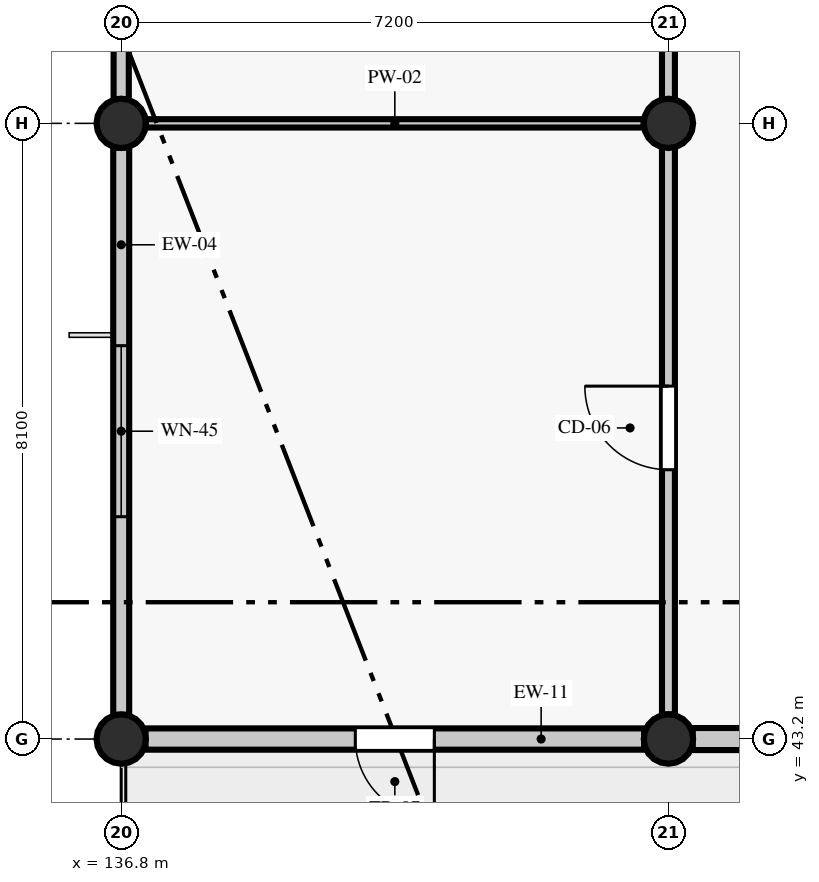
"""IFC4 building model, lengths in metres.
Left out: names, types, materials, properties, quantities, classifications, styles, units other than length and angle.
Written with IfcOpenShell. Run it as: python <this file> out.ifc"""

import sys

from ifc_helpers import new_model, si_unit, direction, frame, frame_2d, origin, origin_2d, place, context, subcontext, project, spatial, rectangle, circle, extrude, element, fill, save


model = new_model("IFC4")
c1 = context("Model", 3, precision=1e-05, world=origin(), true_north=direction((0.0, 1.0)))
c2 = subcontext(c1, "Body", "Model", "MODEL_VIEW")
j1 = project(units=[si_unit("LENGTHUNIT", "METRE"), si_unit("PLANEANGLEUNIT", "RADIAN")], contexts=[c1])
p1 = place(None, origin())
s1 = spatial("IfcSite", under=j1, at=p1, CompositionType="ELEMENT")
p2 = place(p1, origin())
s2 = spatial("IfcBuilding", under=s1, at=p2, CompositionType="ELEMENT")
p3 = place(p2, frame((0.0, 0.0, 4.8)))
s3 = spatial("IfcBuildingStorey", under=s2, at=p3, CompositionType="ELEMENT", Elevation=4.8)
for number, where, z_axis, x_axis in (
    (1, (136.8, 43.2, 0.0), (0.0, 0.0, 1.0), (1.0, 0.0, 0.0)),
    (2, (136.8, 51.3, 0.0), (0.0, 0.0, 1.0), (1.0, 0.0, 0.0)),
    (3, (144.0, 43.2, 0.0), (0.0, 0.0, 1.0), (1.0, 0.0, 0.0)),
    (4, (144.0, 51.3, 0.0), (0.0, 0.0, 1.0), (1.0, 0.0, 0.0)),
):
    element("IfcColumn", number, at=place(p3, frame(where, z_axis=z_axis, x_axis=x_axis)), inside=s3, PredefinedType="COLUMN", context=c2, shape_type="SweptSolid", body=[
        extrude(circle(Radius=0.325, at=origin_2d()), origin(), (0.0, 0.0, 1.0), 4.56),
    ])
p4 = place(p3, frame((137.12, 43.2, 0.0), z_axis=(0.0, 0.0, 1.0), x_axis=(1.0, 0.0, 0.0)))
e5 = element("IfcWall", 5, at=p4, inside=s3, PredefinedType="STANDARD", context=c2, shape_type="SweptSolid", body=[
    extrude(rectangle(XDim=6.56, YDim=0.28, at=frame_2d((3.28, 0.0))), origin(), (0.0, 0.0, 1.0), 3.91),
])
p5 = place(p4, frame((2.76, 0.0, 0.0)))
e6 = element("IfcOpeningElement", 6, at=p5, cuts=e5, PredefinedType="OPENING", context=c2, shape_type="SweptSolid", body=[
    extrude(rectangle(XDim=1.04, YDim=2.1, at=frame_2d((0.52, 1.05))), frame((0.0, 0.15, 0.0), z_axis=(0.0, -1.0, 0.0), x_axis=(1.0, 0.0, 0.0)), (0.0, 0.0, 1.0), 0.3),
])
p6 = place(p3, frame((144.32, 43.2, 0.0), z_axis=(0.0, 0.0, 1.0), x_axis=(1.0, 0.0, 0.0)))
e7 = element("IfcWall", 7, at=p6, inside=s3, PredefinedType="STANDARD", context=c2, shape_type="SweptSolid", body=[
    extrude(rectangle(XDim=2.378, YDim=0.29, at=frame_2d((1.189, 0.0))), origin(), (0.0, 0.0, 1.0), 4.56),
])
p7 = place(p6, frame((0.714, 0.0, 0.9)))
e8 = element("IfcOpeningElement", 8, at=p7, cuts=e7, PredefinedType="OPENING", context=c2, shape_type="SweptSolid", body=[
    extrude(rectangle(XDim=0.95, YDim=1.3, at=frame_2d((0.475, 0.65))), frame((0.0, 0.155, 0.0), z_axis=(0.0, -1.0, 0.0), x_axis=(1.0, 0.0, 0.0)), (0.0, 0.0, 1.0), 0.31),
])
p8 = place(p3, frame((136.8, 59.08, 0.0), z_axis=(0.0, 0.0, 1.0), x_axis=(0.0, -1.0, 0.0)))
e9 = element("IfcWall", 9, at=p8, inside=s3, PredefinedType="STANDARD", context=c2, shape_type="SweptSolid", body=[
    extrude(rectangle(XDim=7.46, YDim=0.2, at=frame_2d((3.73, 0.0))), origin(), (0.0, 0.0, 1.0), 3.91),
])
p9 = place(p8, frame((3.18, 0.0, 0.9)))
e10 = element("IfcOpeningElement", 10, at=p9, cuts=e9, PredefinedType="OPENING", context=c2, shape_type="SweptSolid", body=[
    extrude(rectangle(XDim=2.0, YDim=1.78, at=frame_2d((1.0, 0.89))), frame((0.0, 0.11, 0.0), z_axis=(0.0, -1.0, 0.0), x_axis=(1.0, 0.0, 0.0)), (0.0, 0.0, 1.0), 0.22),
])
p10 = place(p3, frame((136.8, 50.98, 0.0), z_axis=(0.0, 0.0, 1.0), x_axis=(0.0, -1.0, 0.0)))
e11 = element("IfcWall", 11, at=p10, inside=s3, PredefinedType="STANDARD", context=c2, shape_type="SweptSolid", body=[
    extrude(rectangle(XDim=7.46, YDim=0.21, at=frame_2d((3.73, 0.0))), origin(), (0.0, 0.0, 1.0), 3.91),
])
p11 = place(p10, frame((2.605, 0.0, 0.9)))
e12 = element("IfcOpeningElement", 12, at=p11, cuts=e11, PredefinedType="OPENING", context=c2, shape_type="SweptSolid", body=[
    extrude(rectangle(XDim=2.25, YDim=1.78, at=frame_2d((1.125, 0.89))), frame((0.0, 0.115, 0.0), z_axis=(0.0, -1.0, 0.0), x_axis=(1.0, 0.0, 0.0)), (0.0, 0.0, 1.0), 0.23),
])
p12 = place(p3, frame((144.0, 43.525, 0.0), z_axis=(0.0, 0.0, 1.0), x_axis=(0.0, 1.0, 0.0)))
e13 = element("IfcWall", 13, at=p12, inside=s3, PredefinedType="PARTITIONING", context=c2, shape_type="SweptSolid", body=[
    extrude(rectangle(XDim=31.75, YDim=0.17, at=frame_2d((15.875, 0.0))), origin(), (0.0, 0.0, 1.0), 4.068),
])
p13 = place(p12, frame((3.218, 0.0, 0.0)))
e14 = element("IfcOpeningElement", 14, at=p13, cuts=e13, PredefinedType="OPENING", context=c2, shape_type="SweptSolid", body=[
    extrude(rectangle(XDim=1.1, YDim=2.08, at=frame_2d((0.55, 1.04))), frame((0.0, 0.095, 0.0), z_axis=(0.0, -1.0, 0.0), x_axis=(1.0, 0.0, 0.0)), (0.0, 0.0, 1.0), 0.19),
])
p14 = place(p12, frame((8.925, 0.0, 0.0)))
e15 = element("IfcOpeningElement", 15, at=p14, cuts=e13, PredefinedType="OPENING", context=c2, shape_type="SweptSolid", body=[
    extrude(rectangle(XDim=0.9, YDim=2.08, at=frame_2d((0.45, 1.04))), frame((0.0, 0.095, 0.0), z_axis=(0.0, -1.0, 0.0), x_axis=(1.0, 0.0, 0.0)), (0.0, 0.0, 1.0), 0.19),
])
p15 = place(p12, frame((11.6, 0.0, 0.0)))
e16 = element("IfcOpeningElement", 16, at=p15, cuts=e13, PredefinedType="OPENING", context=c2, shape_type="SweptSolid", body=[
    extrude(rectangle(XDim=0.9, YDim=2.13, at=frame_2d((0.45, 1.065))), frame((0.0, 0.095, 0.0), z_axis=(0.0, -1.0, 0.0), x_axis=(1.0, 0.0, 0.0)), (0.0, 0.0, 1.0), 0.19),
])
p16 = place(p12, frame((13.915, 0.0, 0.0)))
e17 = element("IfcOpeningElement", 17, at=p16, cuts=e13, PredefinedType="OPENING", context=c2, shape_type="SweptSolid", body=[
    extrude(rectangle(XDim=0.92, YDim=2.18, at=frame_2d((0.46, 1.09))), frame((0.0, 0.095, 0.0), z_axis=(0.0, -1.0, 0.0), x_axis=(1.0, 0.0, 0.0)), (0.0, 0.0, 1.0), 0.19),
])
p17 = place(p12, frame((19.205, 0.0, 0.0)))
e18 = element("IfcOpeningElement", 18, at=p17, cuts=e13, PredefinedType="OPENING", context=c2, shape_type="SweptSolid", body=[
    extrude(rectangle(XDim=1.05, YDim=2.13, at=frame_2d((0.525, 1.065))), frame((0.0, 0.095, 0.0), z_axis=(0.0, -1.0, 0.0), x_axis=(1.0, 0.0, 0.0)), (0.0, 0.0, 1.0), 0.19),
])
p18 = place(p12, frame((27.256, 0.0, 0.0)))
e19 = element("IfcOpeningElement", 19, at=p18, cuts=e13, PredefinedType="OPENING", context=c2, shape_type="SweptSolid", body=[
    extrude(rectangle(XDim=1.74, YDim=2.26, at=frame_2d((0.87, 1.13))), frame((0.0, 0.095, 0.0), z_axis=(0.0, -1.0, 0.0), x_axis=(1.0, 0.0, 0.0)), (0.0, 0.0, 1.0), 0.19),
])
p19 = place(p3, frame((137.125, 51.3, 0.0), z_axis=(0.0, 0.0, 1.0), x_axis=(1.0, 0.0, 0.0)))
e20 = element("IfcWall", 20, at=p19, inside=s3, PredefinedType="PARTITIONING", context=c2, shape_type="SweptSolid", body=[
    extrude(rectangle(XDim=6.55, YDim=0.11, at=frame_2d((3.275, 0.0))), origin(), (0.0, 0.0, 1.0), 3.86),
])
p20 = place(p5, frame((1.04, 0.0, 0.0), z_axis=(0.0, 0.0, 1.0), x_axis=(-1.0, 0.0, 0.0)))
e21 = element("IfcDoor", 21, at=p20, inside=s3, OperationType="SINGLE_SWING_LEFT", PredefinedType="DOOR", context=c2, shape_type="SweptSolid", body=[
    extrude(rectangle(XDim=1.04, YDim=2.1, at=frame_2d((0.52, 1.05))), frame((0.0, 0.025, 0.0), z_axis=(0.0, -1.0, 0.0), x_axis=(1.0, 0.0, 0.0)), (0.0, 0.0, 1.0), 0.05),
])
fill(e6, e21)
p21 = place(p11, origin())
e22 = element("IfcWindow", 22, at=p21, inside=s3, PartitioningType="SINGLE_PANEL", PredefinedType="WINDOW", context=c2, shape_type="SweptSolid", body=[
    extrude(rectangle(XDim=2.25, YDim=1.78, at=frame_2d((1.125, 0.89))), frame((0.0, 0.03, 0.0), z_axis=(0.0, -1.0, 0.0), x_axis=(1.0, 0.0, 0.0)), (0.0, 0.0, 1.0), 0.06),
])
fill(e12, e22)
p22 = place(p13, origin())
e23 = element("IfcDoor", 23, at=p22, inside=s3, OperationType="SINGLE_SWING_RIGHT", PredefinedType="DOOR", context=c2, shape_type="SweptSolid", body=[
    extrude(rectangle(XDim=1.1, YDim=2.08, at=frame_2d((0.55, 1.04))), frame((0.0, 0.025, 0.0), z_axis=(0.0, -1.0, 0.0), x_axis=(1.0, 0.0, 0.0)), (0.0, 0.0, 1.0), 0.05),
])
fill(e14, e23)
save(model, sys.argv[1])
